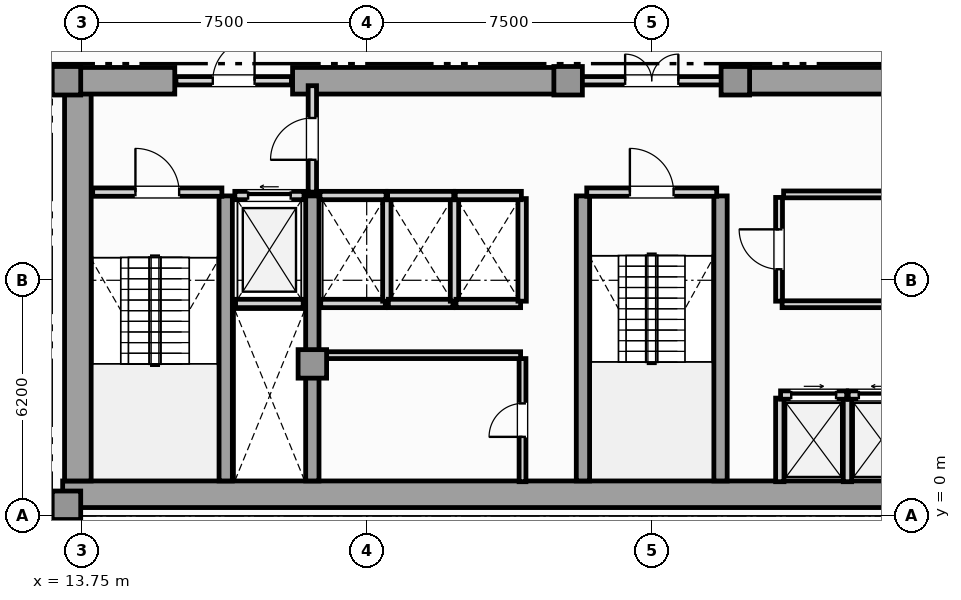
"""IFC4 building model, lengths in metres.
Left out: names, types, materials, properties, quantities, classifications, styles, units other than length and angle.
Written with IfcOpenShell. Run it as: python <this file> out.ifc"""

import sys

from ifc_helpers import new_model, si_unit, direction, frame, frame_2d, origin, origin_2d, place, context, subcontext, project, spatial, rectangle, extrude, element, fill, save


model = new_model("IFC4")
c1 = context("Model", 3, precision=1e-05, world=origin(), true_north=direction((0.0, 1.0)))
c2 = subcontext(c1, "Body", "Model", "MODEL_VIEW")
j1 = project(units=[si_unit("LENGTHUNIT", "METRE"), si_unit("PLANEANGLEUNIT", "RADIAN")], contexts=[c1])
p1 = place(None, origin())
s1 = spatial("IfcSite", under=j1, at=p1, CompositionType="ELEMENT")
p2 = place(p1, origin())
s2 = spatial("IfcBuilding", under=s1, at=p2, CompositionType="ELEMENT")
p3 = place(p2, frame((0.0, 0.0, 149.05)))
s3 = spatial("IfcBuildingStorey", under=s2, at=p3, CompositionType="ELEMENT", Elevation=149.05)
p4 = place(p3, frame((13.25, 0.57, 0.0), z_axis=(0.0, 0.0, 1.0), x_axis=(1.0, 0.0, 0.0)))
e1 = element("IfcWall", 1, at=p4, inside=s3, PredefinedType="SHEAR", context=c2, shape_type="SweptSolid", body=[
    extrude(rectangle(XDim=31.0, YDim=0.7, at=frame_2d((15.5, 0.0))), origin(), (0.0, 0.0, 1.0), 3.63),
])
p5 = place(p3, frame((13.65, 0.92, 0.0), z_axis=(0.0, 0.0, 1.0), x_axis=(0.0, 1.0, 0.0)))
e2 = element("IfcWall", 2, at=p5, inside=s3, PredefinedType="SHEAR", context=c2, shape_type="SweptSolid", body=[
    extrude(rectangle(XDim=10.53, YDim=0.7, at=frame_2d((5.265, 0.0))), origin(), (0.0, 0.0, 1.0), 3.63),
])
p6 = place(p3, frame((13.25, 11.45, 0.0), z_axis=(0.0, 0.0, 1.0), x_axis=(1.0, 0.0, 0.0)))
e3 = element("IfcWall", 3, at=p6, inside=s3, PredefinedType="SHEAR", context=c2, shape_type="SweptSolid", body=[
    extrude(rectangle(XDim=2.95, YDim=0.7, at=frame_2d((1.475, 0.0))), origin(), (0.0, 0.0, 1.0), 3.63),
])
for number, where, z_axis, x_axis in (
    (4, (19.3, 11.45, 0.0), (0.0, 0.0, 1.0), (1.0, 0.0, 0.0)),
    (5, (30.9, 11.45, 0.0), (0.0, 0.0, 1.0), (1.0, 0.0, 0.0)),
):
    element("IfcWall", number, at=place(p3, frame(where, z_axis=z_axis, x_axis=x_axis)), inside=s3, PredefinedType="SHEAR", context=c2, shape_type="SweptSolid", body=[
        extrude(rectangle(XDim=7.3, YDim=0.7, at=frame_2d((3.65, 0.0))), origin(), (0.0, 0.0, 1.0), 3.63),
    ])
for number, where, z_axis, x_axis in (
    (6, (17.54, 0.92, 0.0), (0.0, 0.0, 1.0), (0.0, 1.0, 0.0)),
    (7, (19.82, 0.92, 0.0), (0.0, 0.0, 1.0), (0.0, 1.0, 0.0)),
    (8, (26.94, 0.92, 0.0), (0.0, 0.0, 1.0), (0.0, 1.0, 0.0)),
    (9, (30.56, 0.92, 0.0), (0.0, 0.0, 1.0), (0.0, 1.0, 0.0)),
):
    element("IfcWall", number, at=place(p3, frame(where, z_axis=z_axis, x_axis=x_axis)), inside=s3, PredefinedType="SHEAR", context=c2, shape_type="SweptSolid", body=[
        extrude(rectangle(XDim=7.5, YDim=0.35, at=frame_2d((3.75, 0.0))), origin(), (0.0, 0.0, 1.0), 3.63),
    ])
for number, where, z_axis, x_axis in (
    (10, (13.35, 0.28, 0.0), (0.0, 0.0, 1.0), (1.0, 0.0, 0.0)),
    (11, (13.35, 11.45, 0.0), (0.0, 0.0, 1.0), (1.0, 0.0, 0.0)),
    (12, (19.82, 4.0, 0.0), (0.0, 0.0, 1.0), (1.0, 0.0, 0.0)),
    (13, (26.55, 11.45, 0.0), (0.0, 0.0, 1.0), (1.0, 0.0, 0.0)),
    (14, (30.95, 11.45, 0.0), (0.0, 0.0, 1.0), (1.0, 0.0, 0.0)),
):
    element("IfcColumn", number, at=place(p3, frame(where, z_axis=z_axis, x_axis=x_axis)), inside=s3, PredefinedType="COLUMN", context=c2, shape_type="SweptSolid", body=[
        extrude(rectangle(XDim=0.75, YDim=0.75, at=origin_2d()), origin(), (0.0, 0.0, 1.0), 3.85),
    ])
p7 = place(p3, frame((5.84, 0.18, 0.0), z_axis=(0.0, 0.0, 1.0), x_axis=(1.0, 0.0, 0.0)))
e15 = element("IfcWall", 15, at=p7, inside=s3, PredefinedType="SOLIDWALL", context=c2, shape_type="SweptSolid", body=[
    extrude(rectangle(XDim=7.41, YDim=0.3, at=frame_2d((3.705, 0.0))), origin(), (0.0, 0.0, 1.0), 3.63),
])
p8 = place(p7, frame((2.505, 0.0, 0.85)))
e16 = element("IfcOpeningElement", 16, at=p8, cuts=e15, PredefinedType="OPENING", context=c2, shape_type="SweptSolid", body=[
    extrude(rectangle(XDim=2.4, YDim=2.0, at=frame_2d((1.2, 1.0))), frame((0.0, 0.16, 0.0), z_axis=(0.0, -1.0, 0.0), x_axis=(1.0, 0.0, 0.0)), (0.0, 0.0, 1.0), 0.32),
])
p9 = place(p3, frame((17.8, 5.59, 0.0), z_axis=(0.0, 0.0, 1.0), x_axis=(1.0, 0.0, 0.0)))
e17 = element("IfcWall", 17, at=p9, inside=s3, PredefinedType="SOLIDWALL", context=c2, shape_type="SweptSolid", body=[
    extrude(rectangle(XDim=1.78, YDim=0.22, at=frame_2d((0.89, 0.0))), origin(), (0.0, 0.0, 1.0), 3.63),
])
p10 = place(p3, frame((17.78, 8.43, 0.0), z_axis=(0.0, 0.0, 1.0), x_axis=(1.0, 0.0, 0.0)))
e18 = element("IfcWall", 18, at=p10, inside=s3, PredefinedType="SOLIDWALL", context=c2, shape_type="SweptSolid", body=[
    extrude(rectangle(XDim=1.82, YDim=0.22, at=frame_2d((0.91, 0.0))), origin(), (0.0, 0.0, 1.0), 3.63),
])
p11 = place(p10, frame((0.35, 0.0, 0.0)))
e19 = element("IfcOpeningElement", 19, at=p11, cuts=e18, PredefinedType="OPENING", context=c2, shape_type="SweptSolid", body=[
    extrude(rectangle(XDim=1.12, YDim=2.25, at=frame_2d((0.56, 1.125))), frame((0.0, 0.12, 0.0), z_axis=(0.0, -1.0, 0.0), x_axis=(1.0, 0.0, 0.0)), (0.0, 0.0, 1.0), 0.24),
])
for number, where, z_axis, x_axis in (
    (20, (32.12, 0.9, 0.0), (0.0, 0.0, 1.0), (0.0, 1.0, 0.0)),
    (21, (33.9, 0.9, 0.0), (0.0, 0.0, 1.0), (0.0, 1.0, 0.0)),
):
    element("IfcWall", number, at=place(p3, frame(where, z_axis=z_axis, x_axis=x_axis)), inside=s3, PredefinedType="SOLIDWALL", context=c2, shape_type="SweptSolid", body=[
        extrude(rectangle(XDim=2.2, YDim=0.22, at=frame_2d((1.1, 0.0))), origin(), (0.0, 0.0, 1.0), 3.63),
    ])
p12 = place(p3, frame((32.14, 3.18, 0.0), z_axis=(0.0, 0.0, 1.0), x_axis=(1.0, 0.0, 0.0)))
e22 = element("IfcWall", 22, at=p12, inside=s3, PredefinedType="SOLIDWALL", context=c2, shape_type="SweptSolid", body=[
    extrude(rectangle(XDim=1.74, YDim=0.22, at=frame_2d((0.87, 0.0))), origin(), (0.0, 0.0, 1.0), 3.63),
])
p13 = place(p12, frame((0.28, 0.0, 0.0)))
e23 = element("IfcOpeningElement", 23, at=p13, cuts=e22, PredefinedType="OPENING", context=c2, shape_type="SweptSolid", body=[
    extrude(rectangle(XDim=1.18, YDim=2.2, at=frame_2d((0.59, 1.1))), frame((0.0, 0.12, 0.0), z_axis=(0.0, -1.0, 0.0), x_axis=(1.0, 0.0, 0.0)), (0.0, 0.0, 1.0), 0.24),
])
p14 = place(p3, frame((33.92, 3.18, 0.0), z_axis=(0.0, 0.0, 1.0), x_axis=(1.0, 0.0, 0.0)))
e24 = element("IfcWall", 24, at=p14, inside=s3, PredefinedType="SOLIDWALL", context=c2, shape_type="SweptSolid", body=[
    extrude(rectangle(XDim=1.74, YDim=0.22, at=frame_2d((0.87, 0.0))), origin(), (0.0, 0.0, 1.0), 3.63),
])
p15 = place(p14, frame((0.28, 0.0, 0.0)))
e25 = element("IfcOpeningElement", 25, at=p15, cuts=e24, PredefinedType="OPENING", context=c2, shape_type="SweptSolid", body=[
    extrude(rectangle(XDim=1.18, YDim=2.2, at=frame_2d((0.59, 1.1))), frame((0.0, 0.12, 0.0), z_axis=(0.0, -1.0, 0.0), x_axis=(1.0, 0.0, 0.0)), (0.0, 0.0, 1.0), 0.24),
])
p16 = place(p3, frame((20.04, 5.59, 0.0), z_axis=(0.0, 0.0, 1.0), x_axis=(1.0, 0.0, 0.0)))
e26 = element("IfcWall", 26, at=p16, inside=s3, PredefinedType="SOLIDWALL", context=c2, shape_type="SweptSolid", body=[
    extrude(rectangle(XDim=1.7, YDim=0.22, at=frame_2d((0.85, 0.0))), origin(), (0.0, 0.0, 1.0), 3.63),
])
p17 = place(p3, frame((21.78, 5.65, 0.0), z_axis=(0.0, 0.0, 1.0), x_axis=(0.0, 1.0, 0.0)))
e27 = element("IfcWall", 27, at=p17, inside=s3, PredefinedType="SOLIDWALL", context=c2, shape_type="SweptSolid", body=[
    extrude(rectangle(XDim=2.7, YDim=0.22, at=frame_2d((1.35, 0.0))), origin(), (0.0, 0.0, 1.0), 3.63),
])
p18 = place(p3, frame((20.02, 8.43, 0.0), z_axis=(0.0, 0.0, 1.0), x_axis=(1.0, 0.0, 0.0)))
e28 = element("IfcWall", 28, at=p18, inside=s3, PredefinedType="SOLIDWALL", context=c2, shape_type="SweptSolid", body=[
    extrude(rectangle(XDim=1.74, YDim=0.22, at=frame_2d((0.87, 0.0))), origin(), (0.0, 0.0, 1.0), 3.63),
])
p19 = place(p3, frame((21.82, 5.59, 0.0), z_axis=(0.0, 0.0, 1.0), x_axis=(1.0, 0.0, 0.0)))
e29 = element("IfcWall", 29, at=p19, inside=s3, PredefinedType="SOLIDWALL", context=c2, shape_type="SweptSolid", body=[
    extrude(rectangle(XDim=1.7, YDim=0.22, at=frame_2d((0.85, 0.0))), origin(), (0.0, 0.0, 1.0), 3.63),
])
p20 = place(p3, frame((23.56, 5.65, 0.0), z_axis=(0.0, 0.0, 1.0), x_axis=(0.0, 1.0, 0.0)))
e30 = element("IfcWall", 30, at=p20, inside=s3, PredefinedType="SOLIDWALL", context=c2, shape_type="SweptSolid", body=[
    extrude(rectangle(XDim=2.7, YDim=0.22, at=frame_2d((1.35, 0.0))), origin(), (0.0, 0.0, 1.0), 3.63),
])
p21 = place(p3, frame((21.8, 8.43, 0.0), z_axis=(0.0, 0.0, 1.0), x_axis=(1.0, 0.0, 0.0)))
e31 = element("IfcWall", 31, at=p21, inside=s3, PredefinedType="SOLIDWALL", context=c2, shape_type="SweptSolid", body=[
    extrude(rectangle(XDim=1.74, YDim=0.22, at=frame_2d((0.87, 0.0))), origin(), (0.0, 0.0, 1.0), 3.63),
])
p22 = place(p3, frame((23.6, 5.59, 0.0), z_axis=(0.0, 0.0, 1.0), x_axis=(1.0, 0.0, 0.0)))
e32 = element("IfcWall", 32, at=p22, inside=s3, PredefinedType="SOLIDWALL", context=c2, shape_type="SweptSolid", body=[
    extrude(rectangle(XDim=1.7, YDim=0.22, at=frame_2d((0.85, 0.0))), origin(), (0.0, 0.0, 1.0), 3.63),
])
p23 = place(p3, frame((25.34, 5.65, 0.0), z_axis=(0.0, 0.0, 1.0), x_axis=(0.0, 1.0, 0.0)))
e33 = element("IfcWall", 33, at=p23, inside=s3, PredefinedType="SOLIDWALL", context=c2, shape_type="SweptSolid", body=[
    extrude(rectangle(XDim=2.7, YDim=0.22, at=frame_2d((1.35, 0.0))), origin(), (0.0, 0.0, 1.0), 3.63),
])
p24 = place(p3, frame((23.58, 8.43, 0.0), z_axis=(0.0, 0.0, 1.0), x_axis=(1.0, 0.0, 0.0)))
e34 = element("IfcWall", 34, at=p24, inside=s3, PredefinedType="SOLIDWALL", context=c2, shape_type="SweptSolid", body=[
    extrude(rectangle(XDim=1.74, YDim=0.22, at=frame_2d((0.87, 0.0))), origin(), (0.0, 0.0, 1.0), 3.63),
])
p25 = place(p3, frame((14.04, 8.52, 0.0), z_axis=(0.0, 0.0, 1.0), x_axis=(1.0, 0.0, 0.0)))
e35 = element("IfcWall", 35, at=p25, inside=s3, PredefinedType="SOLIDWALL", context=c2, shape_type="SweptSolid", body=[
    extrude(rectangle(XDim=3.4, YDim=0.22, at=frame_2d((1.7, 0.0))), origin(), (0.0, 0.0, 1.0), 3.63),
])
p26 = place(p25, frame((1.125, 0.0, 0.0)))
e36 = element("IfcOpeningElement", 36, at=p26, cuts=e35, PredefinedType="OPENING", context=c2, shape_type="SweptSolid", body=[
    extrude(rectangle(XDim=1.15, YDim=2.2, at=frame_2d((0.575, 1.1))), frame((0.0, 0.12, 0.0), z_axis=(0.0, -1.0, 0.0), x_axis=(1.0, 0.0, 0.0)), (0.0, 0.0, 1.0), 0.24),
])
p27 = place(p3, frame((27.04, 8.52, 0.0), z_axis=(0.0, 0.0, 1.0), x_axis=(1.0, 0.0, 0.0)))
e37 = element("IfcWall", 37, at=p27, inside=s3, PredefinedType="SOLIDWALL", context=c2, shape_type="SweptSolid", body=[
    extrude(rectangle(XDim=3.42, YDim=0.22, at=frame_2d((1.71, 0.0))), origin(), (0.0, 0.0, 1.0), 3.63),
])
p28 = place(p27, frame((1.135, 0.0, 0.0)))
e38 = element("IfcOpeningElement", 38, at=p28, cuts=e37, PredefinedType="OPENING", context=c2, shape_type="SweptSolid", body=[
    extrude(rectangle(XDim=1.15, YDim=2.2, at=frame_2d((0.575, 1.1))), frame((0.0, 0.12, 0.0), z_axis=(0.0, -1.0, 0.0), x_axis=(1.0, 0.0, 0.0)), (0.0, 0.0, 1.0), 0.24),
])
p29 = place(p3, frame((19.82, 8.52, 0.0), z_axis=(0.0, 0.0, 1.0), x_axis=(0.0, 1.0, 0.0)))
e39 = element("IfcWall", 39, at=p29, inside=s3, PredefinedType="SOLIDWALL", context=c2, shape_type="SweptSolid", body=[
    extrude(rectangle(XDim=2.8, YDim=0.22, at=frame_2d((1.4, 0.0))), origin(), (0.0, 0.0, 1.0), 3.085),
])
p30 = place(p29, frame((0.85, 0.0, 0.0)))
e40 = element("IfcOpeningElement", 40, at=p30, cuts=e39, PredefinedType="OPENING", context=c2, shape_type="SweptSolid", body=[
    extrude(rectangle(XDim=1.1, YDim=2.2, at=frame_2d((0.55, 1.1))), frame((0.0, 0.12, 0.0), z_axis=(0.0, -1.0, 0.0), x_axis=(1.0, 0.0, 0.0)), (0.0, 0.0, 1.0), 0.24),
])
p31 = place(p3, frame((16.23, 11.45, 0.0), z_axis=(0.0, 0.0, 1.0), x_axis=(1.0, 0.0, 0.0)))
e41 = element("IfcWall", 41, at=p31, inside=s3, PredefinedType="SOLIDWALL", context=c2, shape_type="SweptSolid", body=[
    extrude(rectangle(XDim=3.04, YDim=0.22, at=frame_2d((1.52, 0.0))), origin(), (0.0, 0.0, 1.0), 3.63),
])
p32 = place(p31, frame((0.97, 0.0, 0.0)))
e42 = element("IfcOpeningElement", 42, at=p32, cuts=e41, PredefinedType="OPENING", context=c2, shape_type="SweptSolid", body=[
    extrude(rectangle(XDim=1.1, YDim=2.2, at=frame_2d((0.55, 1.1))), frame((0.0, 0.12, 0.0), z_axis=(0.0, -1.0, 0.0), x_axis=(1.0, 0.0, 0.0)), (0.0, 0.0, 1.0), 0.24),
])
p33 = place(p3, frame((26.63, 11.45, 0.0), z_axis=(0.0, 0.0, 1.0), x_axis=(1.0, 0.0, 0.0)))
e43 = element("IfcWall", 43, at=p33, inside=s3, PredefinedType="SOLIDWALL", context=c2, shape_type="SweptSolid", body=[
    extrude(rectangle(XDim=4.24, YDim=0.22, at=frame_2d((2.12, 0.0))), origin(), (0.0, 0.0, 1.0), 3.63),
])
p34 = place(p33, frame((1.42, 0.0, 0.0)))
e44 = element("IfcOpeningElement", 44, at=p34, cuts=e43, PredefinedType="OPENING", context=c2, shape_type="SweptSolid", body=[
    extrude(rectangle(XDim=1.4, YDim=2.2, at=frame_2d((0.7, 1.1))), frame((0.0, 0.12, 0.0), z_axis=(0.0, -1.0, 0.0), x_axis=(1.0, 0.0, 0.0)), (0.0, 0.0, 1.0), 0.24),
])
p35 = place(p3, frame((25.35, 0.9, 0.0), z_axis=(0.0, 0.0, 1.0), x_axis=(0.0, 1.0, 0.0)))
e45 = element("IfcWall", 45, at=p35, inside=s3, PredefinedType="PARTITIONING", context=c2, shape_type="SweptSolid", body=[
    extrude(rectangle(XDim=3.24, YDim=0.18, at=frame_2d((1.62, 0.0))), origin(), (0.0, 0.0, 1.0), 3.63),
])
p36 = place(p35, frame((1.18, 0.0, 0.0)))
e46 = element("IfcOpeningElement", 46, at=p36, cuts=e45, PredefinedType="OPENING", context=c2, shape_type="SweptSolid", body=[
    extrude(rectangle(XDim=0.88, YDim=2.05, at=frame_2d((0.44, 1.025))), frame((0.0, 0.1, 0.0), z_axis=(0.0, -1.0, 0.0), x_axis=(1.0, 0.0, 0.0)), (0.0, 0.0, 1.0), 0.2),
])
p37 = place(p3, frame((19.98, 4.23, 0.0), z_axis=(0.0, 0.0, 1.0), x_axis=(1.0, 0.0, 0.0)))
e47 = element("IfcWall", 47, at=p37, inside=s3, PredefinedType="PARTITIONING", context=c2, shape_type="SweptSolid", body=[
    extrude(rectangle(XDim=5.32, YDim=0.18, at=frame_2d((2.66, 0.0))), origin(), (0.0, 0.0, 1.0), 3.63),
])
p38 = place(p3, frame((32.1, 5.65, 0.0), z_axis=(0.0, 0.0, 1.0), x_axis=(0.0, 1.0, 0.0)))
e48 = element("IfcWall", 48, at=p38, inside=s3, PredefinedType="PARTITIONING", context=c2, shape_type="SweptSolid", body=[
    extrude(rectangle(XDim=2.73, YDim=0.18, at=frame_2d((1.365, 0.0))), origin(), (0.0, 0.0, 1.0), 3.63),
])
p39 = place(p38, frame((0.84, 0.0, 0.0)))
e49 = element("IfcOpeningElement", 49, at=p39, cuts=e48, PredefinedType="OPENING", context=c2, shape_type="SweptSolid", body=[
    extrude(rectangle(XDim=1.05, YDim=2.15, at=frame_2d((0.525, 1.075))), frame((0.0, 0.1, 0.0), z_axis=(0.0, -1.0, 0.0), x_axis=(1.0, 0.0, 0.0)), (0.0, 0.0, 1.0), 0.2),
])
p40 = place(p3, frame((32.22, 8.46, 0.0), z_axis=(0.0, 0.0, 1.0), x_axis=(1.0, 0.0, 0.0)))
e50 = element("IfcWall", 50, at=p40, inside=s3, PredefinedType="PARTITIONING", context=c2, shape_type="SweptSolid", body=[
    extrude(rectangle(XDim=2.88, YDim=0.18, at=frame_2d((1.44, 0.0))), origin(), (0.0, 0.0, 1.0), 3.63),
])
p41 = place(p3, frame((32.18, 5.57, 0.0), z_axis=(0.0, 0.0, 1.0), x_axis=(1.0, 0.0, 0.0)))
e51 = element("IfcWall", 51, at=p41, inside=s3, PredefinedType="PARTITIONING", context=c2, shape_type="SweptSolid", body=[
    extrude(rectangle(XDim=2.92, YDim=0.18, at=frame_2d((1.46, 0.0))), origin(), (0.0, 0.0, 1.0), 3.63),
])
p42 = place(p3, frame((6.105, 11.6, 0.0), z_axis=(0.0, 0.0, 1.0), x_axis=(1.0, 0.0, 0.0)))
e52 = element("IfcWall", 52, at=p42, inside=s3, PredefinedType="PARTITIONING", context=c2, shape_type="SweptSolid", body=[
    extrude(rectangle(XDim=7.04, YDim=0.18, at=frame_2d((3.52, 0.0))), origin(), (0.0, 0.0, 1.0), 3.63),
])
p43 = place(p42, frame((3.02, 0.0, 0.0)))
e53 = element("IfcOpeningElement", 53, at=p43, cuts=e52, PredefinedType="OPENING", context=c2, shape_type="SweptSolid", body=[
    extrude(rectangle(XDim=1.0, YDim=2.15, at=frame_2d((0.5, 1.075))), frame((0.0, 0.1, 0.0), z_axis=(0.0, -1.0, 0.0), x_axis=(1.0, 0.0, 0.0)), (0.0, 0.0, 1.0), 0.2),
])
p44 = place(p11, origin())
e54 = element("IfcDoor", 54, at=p44, inside=s3, OperationType="SLIDING_TO_LEFT", PredefinedType="DOOR", context=c2, shape_type="SweptSolid", body=[
    extrude(rectangle(XDim=1.12, YDim=2.25, at=frame_2d((0.56, 1.125))), frame((0.0, 0.025, 0.0), z_axis=(0.0, -1.0, 0.0), x_axis=(1.0, 0.0, 0.0)), (0.0, 0.0, 1.0), 0.05),
])
fill(e19, e54)
p45 = place(p13, origin())
e55 = element("IfcDoor", 55, at=p45, inside=s3, OperationType="SLIDING_TO_RIGHT", PredefinedType="DOOR", context=c2, shape_type="SweptSolid", body=[
    extrude(rectangle(XDim=1.18, YDim=2.2, at=frame_2d((0.59, 1.1))), frame((0.0, 0.025, 0.0), z_axis=(0.0, -1.0, 0.0), x_axis=(1.0, 0.0, 0.0)), (0.0, 0.0, 1.0), 0.05),
])
fill(e23, e55)
p46 = place(p15, origin())
e56 = element("IfcDoor", 56, at=p46, inside=s3, OperationType="SLIDING_TO_LEFT", PredefinedType="DOOR", context=c2, shape_type="SweptSolid", body=[
    extrude(rectangle(XDim=1.18, YDim=2.2, at=frame_2d((0.59, 1.1))), frame((0.0, 0.025, 0.0), z_axis=(0.0, -1.0, 0.0), x_axis=(1.0, 0.0, 0.0)), (0.0, 0.0, 1.0), 0.05),
])
fill(e25, e56)
p47 = place(p26, origin())
e57 = element("IfcDoor", 57, at=p47, inside=s3, OperationType="SINGLE_SWING_LEFT", PredefinedType="DOOR", context=c2, shape_type="SweptSolid", body=[
    extrude(rectangle(XDim=1.15, YDim=2.2, at=frame_2d((0.575, 1.1))), frame((0.0, 0.025, 0.0), z_axis=(0.0, -1.0, 0.0), x_axis=(1.0, 0.0, 0.0)), (0.0, 0.0, 1.0), 0.05),
])
fill(e36, e57)
p48 = place(p28, origin())
e58 = element("IfcDoor", 58, at=p48, inside=s3, OperationType="SINGLE_SWING_LEFT", PredefinedType="DOOR", context=c2, shape_type="SweptSolid", body=[
    extrude(rectangle(XDim=1.15, YDim=2.2, at=frame_2d((0.575, 1.1))), frame((0.0, 0.025, 0.0), z_axis=(0.0, -1.0, 0.0), x_axis=(1.0, 0.0, 0.0)), (0.0, 0.0, 1.0), 0.05),
])
fill(e38, e58)
p49 = place(p30, origin())
e59 = element("IfcDoor", 59, at=p49, inside=s3, OperationType="SINGLE_SWING_LEFT", PredefinedType="DOOR", context=c2, shape_type="SweptSolid", body=[
    extrude(rectangle(XDim=1.1, YDim=2.2, at=frame_2d((0.55, 1.1))), frame((0.0, 0.025, 0.0), z_axis=(0.0, -1.0, 0.0), x_axis=(1.0, 0.0, 0.0)), (0.0, 0.0, 1.0), 0.05),
])
fill(e40, e59)
p50 = place(p32, origin())
e60 = element("IfcDoor", 60, at=p50, inside=s3, OperationType="SINGLE_SWING_RIGHT", PredefinedType="DOOR", context=c2, shape_type="SweptSolid", body=[
    extrude(rectangle(XDim=1.1, YDim=2.2, at=frame_2d((0.55, 1.1))), frame((0.0, 0.025, 0.0), z_axis=(0.0, -1.0, 0.0), x_axis=(1.0, 0.0, 0.0)), (0.0, 0.0, 1.0), 0.05),
])
fill(e42, e60)
p51 = place(p34, origin())
e61 = element("IfcDoor", 61, at=p51, inside=s3, OperationType="DOUBLE_DOOR_SINGLE_SWING", PredefinedType="DOOR", context=c2, shape_type="SweptSolid", body=[
    extrude(rectangle(XDim=1.4, YDim=2.2, at=frame_2d((0.7, 1.1))), frame((0.0, 0.025, 0.0), z_axis=(0.0, -1.0, 0.0), x_axis=(1.0, 0.0, 0.0)), (0.0, 0.0, 1.0), 0.05),
])
fill(e44, e61)
p52 = place(p36, origin())
e62 = element("IfcDoor", 62, at=p52, inside=s3, OperationType="SINGLE_SWING_LEFT", PredefinedType="DOOR", context=c2, shape_type="SweptSolid", body=[
    extrude(rectangle(XDim=0.88, YDim=2.05, at=frame_2d((0.44, 1.025))), frame((0.0, 0.025, 0.0), z_axis=(0.0, -1.0, 0.0), x_axis=(1.0, 0.0, 0.0)), (0.0, 0.0, 1.0), 0.05),
])
fill(e46, e62)
p53 = place(p39, origin())
e63 = element("IfcDoor", 63, at=p53, inside=s3, OperationType="SINGLE_SWING_RIGHT", PredefinedType="DOOR", context=c2, shape_type="SweptSolid", body=[
    extrude(rectangle(XDim=1.05, YDim=2.15, at=frame_2d((0.525, 1.075))), frame((0.0, 0.025, 0.0), z_axis=(0.0, -1.0, 0.0), x_axis=(1.0, 0.0, 0.0)), (0.0, 0.0, 1.0), 0.05),
])
fill(e49, e63)
save(model, sys.argv[1])
